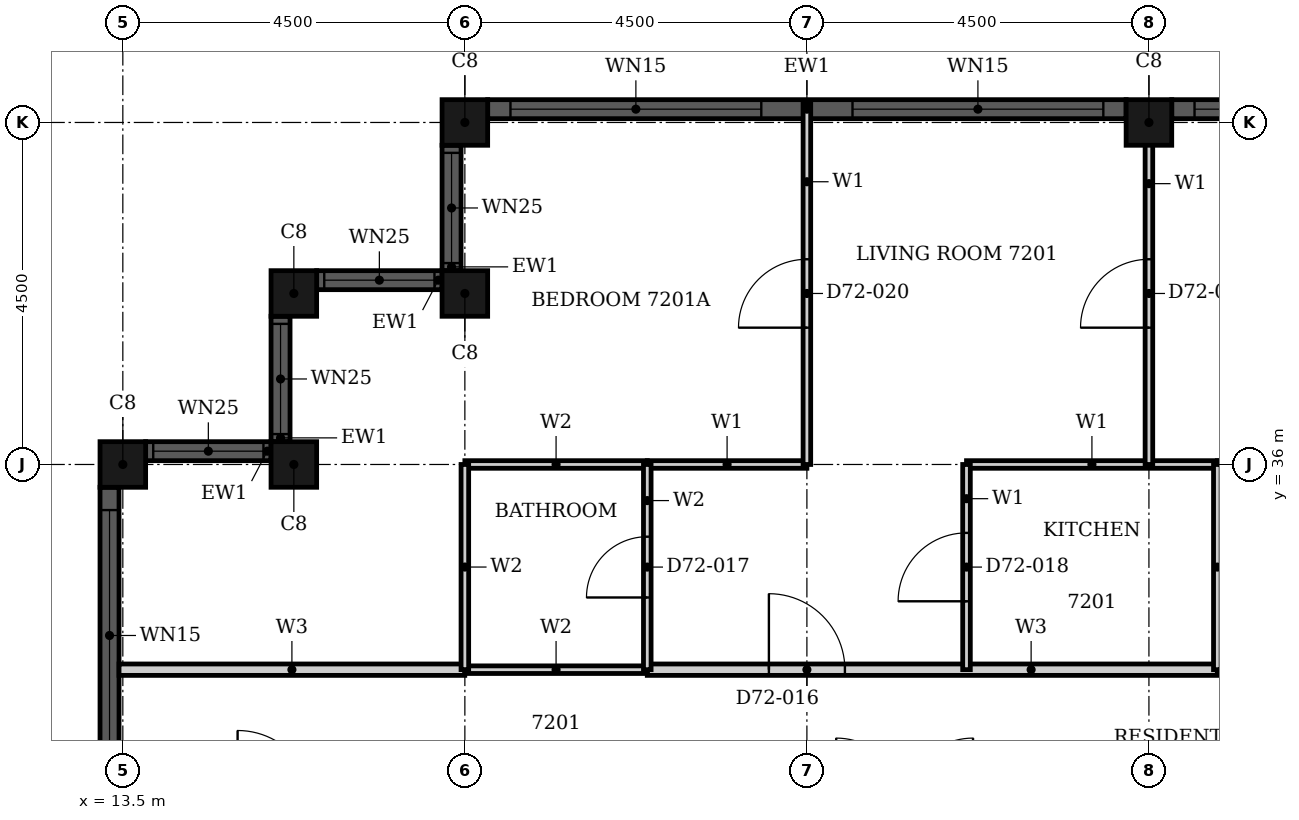
"""IFC4 building model, lengths in metres.
Left out: names, types, materials, properties, quantities, classifications, styles, units other than length and angle.
Written with IfcOpenShell. Run it as: python <this file> out.ifc"""

import sys

from ifc_helpers import new_model, si_unit, direction, frame, frame_2d, origin, origin_2d, place, context, subcontext, project, spatial, rectangle, hollow_rectangle, extrude, element, fill, save


model = new_model("IFC4")
c1 = context("Model", 3, precision=1e-05, world=origin(), true_north=direction((0.0, 1.0)))
c2 = subcontext(c1, "Body", "Model", "MODEL_VIEW")
j1 = project(units=[si_unit("LENGTHUNIT", "METRE"), si_unit("PLANEANGLEUNIT", "RADIAN")], contexts=[c1])
p1 = place(None, origin())
s1 = spatial("IfcSite", under=j1, at=p1, CompositionType="ELEMENT")
p2 = place(p1, origin())
s2 = spatial("IfcBuilding", under=s1, at=p2, CompositionType="ELEMENT")
p3 = place(p2, frame((0.0, 0.0, 283.4)))
s3 = spatial("IfcBuildingStorey", under=s2, at=p3, CompositionType="ELEMENT", Elevation=283.4)
for number, where, z_axis, x_axis in (
    (1, (27.0, 40.5, 0.0), (0.0, 0.0, 1.0), (1.0, 0.0, 0.0)),
    (2, (18.0, 40.5, 0.0), (0.0, 0.0, 1.0), (1.0, 0.0, 0.0)),
    (3, (18.0, 38.25, 0.0), (0.0, 0.0, 1.0), (1.0, 0.0, 0.0)),
    (4, (15.75, 38.25, 0.0), (0.0, 0.0, 1.0), (1.0, 0.0, 0.0)),
    (5, (15.75, 36.0, 0.0), (0.0, 0.0, 1.0), (1.0, 0.0, 0.0)),
    (6, (13.5, 36.0, 0.0), (0.0, 0.0, 1.0), (1.0, 0.0, 0.0)),
):
    element("IfcColumn", number, at=place(p3, frame(where, z_axis=z_axis, x_axis=x_axis)), inside=s3, PredefinedType="COLUMN", context=c2, shape_type="SweptSolid", body=[
        extrude(hollow_rectangle(XDim=0.6, YDim=0.6, WallThickness=0.02, at=origin_2d()), origin(), (0.0, 0.0, 1.0), 3.7),
    ])
p4 = place(p3, frame((35.7, 40.675, 0.0), z_axis=(0.0, 0.0, 1.0), x_axis=(-1.0, 0.0, 0.0)))
e7 = element("IfcWall", 7, at=p4, inside=s3, PredefinedType="SOLIDWALL", context=c2, shape_type="SweptSolid", body=[
    extrude(rectangle(XDim=8.4, YDim=0.25, at=frame_2d((4.2, 0.0))), origin(), (0.0, 0.0, 1.0), 3.7),
])
p5 = place(p4, frame((0.3, 0.0, 0.45)))
e8 = element("IfcOpeningElement", 8, at=p5, cuts=e7, PredefinedType="OPENING", context=c2, shape_type="SweptSolid", body=[
    extrude(rectangle(XDim=3.3, YDim=2.3, at=frame_2d((1.65, 1.15))), frame((0.0, 0.135, 0.0), z_axis=(0.0, -1.0, 0.0), x_axis=(1.0, 0.0, 0.0)), (0.0, 0.0, 1.0), 0.27),
])
p6 = place(p4, frame((4.8, 0.0, 0.45)))
e9 = element("IfcOpeningElement", 9, at=p6, cuts=e7, PredefinedType="OPENING", context=c2, shape_type="SweptSolid", body=[
    extrude(rectangle(XDim=3.3, YDim=2.3, at=frame_2d((1.65, 1.15))), frame((0.0, 0.135, 0.0), z_axis=(0.0, -1.0, 0.0), x_axis=(1.0, 0.0, 0.0)), (0.0, 0.0, 1.0), 0.27),
])
p7 = place(p3, frame((26.7, 40.675, 0.0), z_axis=(0.0, 0.0, 1.0), x_axis=(-1.0, 0.0, 0.0)))
e10 = element("IfcWall", 10, at=p7, inside=s3, PredefinedType="SOLIDWALL", context=c2, shape_type="SweptSolid", body=[
    extrude(rectangle(XDim=8.4, YDim=0.25, at=frame_2d((4.2, 0.0))), origin(), (0.0, 0.0, 1.0), 3.7),
])
p8 = place(p7, frame((0.3, 0.0, 0.45)))
e11 = element("IfcOpeningElement", 11, at=p8, cuts=e10, PredefinedType="OPENING", context=c2, shape_type="SweptSolid", body=[
    extrude(rectangle(XDim=3.3, YDim=2.3, at=frame_2d((1.65, 1.15))), frame((0.0, 0.135, 0.0), z_axis=(0.0, -1.0, 0.0), x_axis=(1.0, 0.0, 0.0)), (0.0, 0.0, 1.0), 0.27),
])
p9 = place(p7, frame((4.8, 0.0, 0.45)))
e12 = element("IfcOpeningElement", 12, at=p9, cuts=e10, PredefinedType="OPENING", context=c2, shape_type="SweptSolid", body=[
    extrude(rectangle(XDim=3.3, YDim=2.3, at=frame_2d((1.65, 1.15))), frame((0.0, 0.135, 0.0), z_axis=(0.0, -1.0, 0.0), x_axis=(1.0, 0.0, 0.0)), (0.0, 0.0, 1.0), 0.27),
])
p10 = place(p3, frame((17.825, 40.2, 0.0), z_axis=(0.0, 0.0, 1.0), x_axis=(0.0, -1.0, 0.0)))
e13 = element("IfcWall", 13, at=p10, inside=s3, PredefinedType="SOLIDWALL", context=c2, shape_type="SweptSolid", body=[
    extrude(rectangle(XDim=1.65, YDim=0.25, at=frame_2d((0.825, 0.0))), origin(), (0.0, 0.0, 1.0), 3.7),
])
p11 = place(p10, frame((0.1, 0.0, 0.9)))
e14 = element("IfcOpeningElement", 14, at=p11, cuts=e13, PredefinedType="OPENING", context=c2, shape_type="SweptSolid", body=[
    extrude(rectangle(XDim=1.45, YDim=1.85, at=frame_2d((0.725, 0.925))), frame((0.0, 0.135, 0.0), z_axis=(0.0, -1.0, 0.0), x_axis=(1.0, 0.0, 0.0)), (0.0, 0.0, 1.0), 0.27),
])
p12 = place(p3, frame((17.7, 38.425, 0.0), z_axis=(0.0, 0.0, 1.0), x_axis=(-1.0, 0.0, 0.0)))
e15 = element("IfcWall", 15, at=p12, inside=s3, PredefinedType="SOLIDWALL", context=c2, shape_type="SweptSolid", body=[
    extrude(rectangle(XDim=1.65, YDim=0.25, at=frame_2d((0.825, 0.0))), origin(), (0.0, 0.0, 1.0), 3.7),
])
p13 = place(p12, frame((0.1, 0.0, 0.9)))
e16 = element("IfcOpeningElement", 16, at=p13, cuts=e15, PredefinedType="OPENING", context=c2, shape_type="SweptSolid", body=[
    extrude(rectangle(XDim=1.45, YDim=1.85, at=frame_2d((0.725, 0.925))), frame((0.0, 0.135, 0.0), z_axis=(0.0, -1.0, 0.0), x_axis=(1.0, 0.0, 0.0)), (0.0, 0.0, 1.0), 0.27),
])
p14 = place(p3, frame((15.575, 37.95, 0.0), z_axis=(0.0, 0.0, 1.0), x_axis=(0.0, -1.0, 0.0)))
e17 = element("IfcWall", 17, at=p14, inside=s3, PredefinedType="SOLIDWALL", context=c2, shape_type="SweptSolid", body=[
    extrude(rectangle(XDim=1.65, YDim=0.25, at=frame_2d((0.825, 0.0))), origin(), (0.0, 0.0, 1.0), 3.7),
])
p15 = place(p14, frame((0.1, 0.0, 0.9)))
e18 = element("IfcOpeningElement", 18, at=p15, cuts=e17, PredefinedType="OPENING", context=c2, shape_type="SweptSolid", body=[
    extrude(rectangle(XDim=1.45, YDim=1.85, at=frame_2d((0.725, 0.925))), frame((0.0, 0.135, 0.0), z_axis=(0.0, -1.0, 0.0), x_axis=(1.0, 0.0, 0.0)), (0.0, 0.0, 1.0), 0.27),
])
p16 = place(p3, frame((15.45, 36.175, 0.0), z_axis=(0.0, 0.0, 1.0), x_axis=(-1.0, 0.0, 0.0)))
e19 = element("IfcWall", 19, at=p16, inside=s3, PredefinedType="SOLIDWALL", context=c2, shape_type="SweptSolid", body=[
    extrude(rectangle(XDim=1.65, YDim=0.25, at=frame_2d((0.825, 0.0))), origin(), (0.0, 0.0, 1.0), 3.7),
])
p17 = place(p16, frame((0.1, 0.0, 0.9)))
e20 = element("IfcOpeningElement", 20, at=p17, cuts=e19, PredefinedType="OPENING", context=c2, shape_type="SweptSolid", body=[
    extrude(rectangle(XDim=1.45, YDim=1.85, at=frame_2d((0.725, 0.925))), frame((0.0, 0.135, 0.0), z_axis=(0.0, -1.0, 0.0), x_axis=(1.0, 0.0, 0.0)), (0.0, 0.0, 1.0), 0.27),
])
p18 = place(p3, frame((13.325, 35.7, 0.0), z_axis=(0.0, 0.0, 1.0), x_axis=(0.0, -1.0, 0.0)))
e21 = element("IfcWall", 21, at=p18, inside=s3, PredefinedType="SOLIDWALL", context=c2, shape_type="SweptSolid", body=[
    extrude(rectangle(XDim=8.4, YDim=0.25, at=frame_2d((4.2, 0.0))), origin(), (0.0, 0.0, 1.0), 3.7),
])
p19 = place(p18, frame((0.3, 0.0, 0.45)))
e22 = element("IfcOpeningElement", 22, at=p19, cuts=e21, PredefinedType="OPENING", context=c2, shape_type="SweptSolid", body=[
    extrude(rectangle(XDim=3.3, YDim=2.3, at=frame_2d((1.65, 1.15))), frame((0.0, 0.135, 0.0), z_axis=(0.0, -1.0, 0.0), x_axis=(1.0, 0.0, 0.0)), (0.0, 0.0, 1.0), 0.27),
])
p20 = place(p18, frame((4.8, 0.0, 0.45)))
e23 = element("IfcOpeningElement", 23, at=p20, cuts=e21, PredefinedType="OPENING", context=c2, shape_type="SweptSolid", body=[
    extrude(rectangle(XDim=3.3, YDim=2.3, at=frame_2d((1.65, 1.15))), frame((0.0, 0.135, 0.0), z_axis=(0.0, -1.0, 0.0), x_axis=(1.0, 0.0, 0.0)), (0.0, 0.0, 1.0), 0.27),
])
p21 = place(p3, frame((13.45, 33.3, 0.0), z_axis=(0.0, 0.0, 1.0), x_axis=(1.0, 0.0, 0.0)))
e24 = element("IfcWall", 24, at=p21, inside=s3, PredefinedType="PARTITIONING", context=c2, shape_type="SweptSolid", body=[
    extrude(rectangle(XDim=4.549, YDim=0.15, at=frame_2d((2.274, 0.0))), origin(), (0.0, 0.0, 1.0), 3.4),
])
p22 = place(p3, frame((20.4, 33.3, 0.0), z_axis=(0.0, 0.0, 1.0), x_axis=(1.0, 0.0, 0.0)))
e25 = element("IfcWall", 25, at=p22, inside=s3, PredefinedType="PARTITIONING", context=c2, shape_type="SweptSolid", body=[
    extrude(rectangle(XDim=7.5, YDim=0.15, at=frame_2d((3.75, 0.0))), origin(), (0.0, 0.0, 1.0), 3.4),
])
p23 = place(p22, frame((1.6, 0.0, 0.0)))
e26 = element("IfcOpeningElement", 26, at=p23, cuts=e25, PredefinedType="OPENING", context=c2, shape_type="SweptSolid", body=[
    extrude(rectangle(XDim=1.0, YDim=2.2, at=frame_2d((0.5, 1.1))), frame((0.0, 0.085, 0.0), z_axis=(0.0, -1.0, 0.0), x_axis=(1.0, 0.0, 0.0)), (0.0, 0.0, 1.0), 0.17),
])
p24 = place(p3, frame((20.4, 36.0, 0.0), z_axis=(0.0, 0.0, 1.0), x_axis=(1.0, 0.0, 0.0)))
e27 = element("IfcWall", 27, at=p24, inside=s3, PredefinedType="PARTITIONING", context=c2, shape_type="SweptSolid", body=[
    extrude(rectangle(XDim=2.1, YDim=0.1, at=frame_2d((1.05, 0.0))), origin(), (0.0, 0.0, 1.0), 3.4),
])
p25 = place(p3, frame((24.6, 36.0, 0.0), z_axis=(0.0, 0.0, 1.0), x_axis=(1.0, 0.0, 0.0)))
e28 = element("IfcWall", 28, at=p25, inside=s3, PredefinedType="PARTITIONING", context=c2, shape_type="SweptSolid", body=[
    extrude(rectangle(XDim=3.3, YDim=0.1, at=frame_2d((1.65, 0.0))), origin(), (0.0, 0.0, 1.0), 3.4),
])
p26 = place(p3, frame((22.5, 36.0, 0.0), z_axis=(0.0, 0.0, 1.0), x_axis=(0.0, 1.0, 0.0)))
e29 = element("IfcWall", 29, at=p26, inside=s3, PredefinedType="PARTITIONING", context=c2, shape_type="SweptSolid", body=[
    extrude(rectangle(XDim=4.74, YDim=0.1, at=frame_2d((2.37, 0.0))), origin(), (0.0, 0.0, 1.0), 3.4),
])
p27 = place(p26, frame((1.8, 0.0, 0.0)))
e30 = element("IfcOpeningElement", 30, at=p27, cuts=e29, PredefinedType="OPENING", context=c2, shape_type="SweptSolid", body=[
    extrude(rectangle(XDim=0.9, YDim=2.1, at=frame_2d((0.45, 1.05))), frame((0.0, 0.06, 0.0), z_axis=(0.0, -1.0, 0.0), x_axis=(1.0, 0.0, 0.0)), (0.0, 0.0, 1.0), 0.12),
])
p28 = place(p3, frame((24.6, 33.3, 0.0), z_axis=(0.0, 0.0, 1.0), x_axis=(0.0, 1.0, 0.0)))
e31 = element("IfcWall", 31, at=p28, inside=s3, PredefinedType="PARTITIONING", context=c2, shape_type="SweptSolid", body=[
    extrude(rectangle(XDim=2.7, YDim=0.1, at=frame_2d((1.35, 0.0))), origin(), (0.0, 0.0, 1.0), 3.4),
])
p29 = place(p28, frame((0.9, 0.0, 0.0)))
e32 = element("IfcOpeningElement", 32, at=p29, cuts=e31, PredefinedType="OPENING", context=c2, shape_type="SweptSolid", body=[
    extrude(rectangle(XDim=0.9, YDim=2.1, at=frame_2d((0.45, 1.05))), frame((0.0, 0.06, 0.0), z_axis=(0.0, -1.0, 0.0), x_axis=(1.0, 0.0, 0.0)), (0.0, 0.0, 1.0), 0.12),
])
p30 = place(p3, frame((27.0, 36.0, 0.0), z_axis=(0.0, 0.0, 1.0), x_axis=(0.0, 1.0, 0.0)))
e33 = element("IfcWall", 33, at=p30, inside=s3, PredefinedType="PARTITIONING", context=c2, shape_type="SweptSolid", body=[
    extrude(rectangle(XDim=4.69, YDim=0.1, at=frame_2d((2.345, 0.0))), origin(), (0.0, 0.0, 1.0), 3.4),
])
p31 = place(p30, frame((1.8, 0.0, 0.0)))
e34 = element("IfcOpeningElement", 34, at=p31, cuts=e33, PredefinedType="OPENING", context=c2, shape_type="SweptSolid", body=[
    extrude(rectangle(XDim=0.9, YDim=2.1, at=frame_2d((0.45, 1.05))), frame((0.0, 0.06, 0.0), z_axis=(0.0, -1.0, 0.0), x_axis=(1.0, 0.0, 0.0)), (0.0, 0.0, 1.0), 0.12),
])
p32 = place(p3, frame((18.0, 33.3, 0.0), z_axis=(0.0, 0.0, 1.0), x_axis=(1.0, 0.0, 0.0)))
e35 = element("IfcWall", 35, at=p32, inside=s3, PredefinedType="PARTITIONING", context=c2, shape_type="SweptSolid", body=[
    extrude(rectangle(XDim=2.4, YDim=0.1, at=frame_2d((1.2, 0.0))), origin(), (0.0, 0.0, 1.0), 3.4),
])
p33 = place(p3, frame((27.9, 33.3, 0.0), z_axis=(0.0, 0.0, 1.0), x_axis=(1.0, 0.0, 0.0)))
e36 = element("IfcWall", 36, at=p33, inside=s3, PredefinedType="PARTITIONING", context=c2, shape_type="SweptSolid", body=[
    extrude(rectangle(XDim=7.2, YDim=0.1, at=frame_2d((3.6, 0.0))), origin(), (0.0, 0.0, 1.0), 3.4),
])
p34 = place(p3, frame((18.0, 36.0, 0.0), z_axis=(0.0, 0.0, 1.0), x_axis=(1.0, 0.0, 0.0)))
e37 = element("IfcWall", 37, at=p34, inside=s3, PredefinedType="PARTITIONING", context=c2, shape_type="SweptSolid", body=[
    extrude(rectangle(XDim=2.4, YDim=0.1, at=frame_2d((1.2, 0.0))), origin(), (0.0, 0.0, 1.0), 3.4),
])
p35 = place(p3, frame((27.9, 36.0, 0.0), z_axis=(0.0, 0.0, 1.0), x_axis=(1.0, 0.0, 0.0)))
e38 = element("IfcWall", 38, at=p35, inside=s3, PredefinedType="PARTITIONING", context=c2, shape_type="SweptSolid", body=[
    extrude(rectangle(XDim=7.2, YDim=0.1, at=frame_2d((3.6, 0.0))), origin(), (0.0, 0.0, 1.0), 3.4),
])
p36 = place(p35, frame((1.4, 0.0, 0.0)))
e39 = element("IfcOpeningElement", 39, at=p36, cuts=e38, PredefinedType="OPENING", context=c2, shape_type="SweptSolid", body=[
    extrude(rectangle(XDim=0.8, YDim=2.1, at=frame_2d((0.4, 1.05))), frame((0.0, 0.06, 0.0), z_axis=(0.0, -1.0, 0.0), x_axis=(1.0, 0.0, 0.0)), (0.0, 0.0, 1.0), 0.12),
])
p37 = place(p35, frame((5.0, 0.0, 0.0)))
e40 = element("IfcOpeningElement", 40, at=p37, cuts=e38, PredefinedType="OPENING", context=c2, shape_type="SweptSolid", body=[
    extrude(rectangle(XDim=0.8, YDim=2.1, at=frame_2d((0.4, 1.05))), frame((0.0, 0.06, 0.0), z_axis=(0.0, -1.0, 0.0), x_axis=(1.0, 0.0, 0.0)), (0.0, 0.0, 1.0), 0.12),
])
p38 = place(p3, frame((18.0, 33.301, 0.0), z_axis=(0.0, 0.0, 1.0), x_axis=(0.0, 1.0, 0.0)))
e41 = element("IfcWall", 41, at=p38, inside=s3, PredefinedType="PARTITIONING", context=c2, shape_type="SweptSolid", body=[
    extrude(rectangle(XDim=2.699, YDim=0.1, at=frame_2d((1.35, 0.0))), origin(), (0.0, 0.0, 1.0), 3.4),
])
p39 = place(p3, frame((20.4, 33.3, 0.0), z_axis=(0.0, 0.0, 1.0), x_axis=(0.0, 1.0, 0.0)))
e42 = element("IfcWall", 42, at=p39, inside=s3, PredefinedType="PARTITIONING", context=c2, shape_type="SweptSolid", body=[
    extrude(rectangle(XDim=2.7, YDim=0.1, at=frame_2d((1.35, 0.0))), origin(), (0.0, 0.0, 1.0), 3.4),
])
p40 = place(p39, frame((0.95, 0.0, 0.0)))
e43 = element("IfcOpeningElement", 43, at=p40, cuts=e42, PredefinedType="OPENING", context=c2, shape_type="SweptSolid", body=[
    extrude(rectangle(XDim=0.8, YDim=2.1, at=frame_2d((0.4, 1.05))), frame((0.0, 0.06, 0.0), z_axis=(0.0, -1.0, 0.0), x_axis=(1.0, 0.0, 0.0)), (0.0, 0.0, 1.0), 0.12),
])
p41 = place(p3, frame((27.9, 33.3, 0.0), z_axis=(0.0, 0.0, 1.0), x_axis=(0.0, 1.0, 0.0)))
e44 = element("IfcWall", 44, at=p41, inside=s3, PredefinedType="PARTITIONING", context=c2, shape_type="SweptSolid", body=[
    extrude(rectangle(XDim=2.7, YDim=0.1, at=frame_2d((1.35, 0.0))), origin(), (0.0, 0.0, 1.0), 3.4),
])
p42 = place(p6, origin())
e45 = element("IfcWindow", 45, at=p42, inside=s3, PartitioningType="SINGLE_PANEL", PredefinedType="WINDOW", context=c2, shape_type="SweptSolid", body=[
    extrude(rectangle(XDim=3.3, YDim=2.3, at=frame_2d((1.65, 1.15))), frame((0.0, 0.03, 0.0), z_axis=(0.0, -1.0, 0.0), x_axis=(1.0, 0.0, 0.0)), (0.0, 0.0, 1.0), 0.06),
])
fill(e9, e45)
p43 = place(p8, origin())
e46 = element("IfcWindow", 46, at=p43, inside=s3, PartitioningType="SINGLE_PANEL", PredefinedType="WINDOW", context=c2, shape_type="SweptSolid", body=[
    extrude(rectangle(XDim=3.3, YDim=2.3, at=frame_2d((1.65, 1.15))), frame((0.0, 0.03, 0.0), z_axis=(0.0, -1.0, 0.0), x_axis=(1.0, 0.0, 0.0)), (0.0, 0.0, 1.0), 0.06),
])
fill(e11, e46)
p44 = place(p9, origin())
e47 = element("IfcWindow", 47, at=p44, inside=s3, PartitioningType="SINGLE_PANEL", PredefinedType="WINDOW", context=c2, shape_type="SweptSolid", body=[
    extrude(rectangle(XDim=3.3, YDim=2.3, at=frame_2d((1.65, 1.15))), frame((0.0, 0.03, 0.0), z_axis=(0.0, -1.0, 0.0), x_axis=(1.0, 0.0, 0.0)), (0.0, 0.0, 1.0), 0.06),
])
fill(e12, e47)
p45 = place(p11, origin())
e48 = element("IfcWindow", 48, at=p45, inside=s3, PartitioningType="SINGLE_PANEL", PredefinedType="WINDOW", context=c2, shape_type="SweptSolid", body=[
    extrude(rectangle(XDim=1.45, YDim=1.85, at=frame_2d((0.725, 0.925))), frame((0.0, 0.03, 0.0), z_axis=(0.0, -1.0, 0.0), x_axis=(1.0, 0.0, 0.0)), (0.0, 0.0, 1.0), 0.06),
])
fill(e14, e48)
p46 = place(p13, origin())
e49 = element("IfcWindow", 49, at=p46, inside=s3, PartitioningType="SINGLE_PANEL", PredefinedType="WINDOW", context=c2, shape_type="SweptSolid", body=[
    extrude(rectangle(XDim=1.45, YDim=1.85, at=frame_2d((0.725, 0.925))), frame((0.0, 0.03, 0.0), z_axis=(0.0, -1.0, 0.0), x_axis=(1.0, 0.0, 0.0)), (0.0, 0.0, 1.0), 0.06),
])
fill(e16, e49)
p47 = place(p15, origin())
e50 = element("IfcWindow", 50, at=p47, inside=s3, PartitioningType="SINGLE_PANEL", PredefinedType="WINDOW", context=c2, shape_type="SweptSolid", body=[
    extrude(rectangle(XDim=1.45, YDim=1.85, at=frame_2d((0.725, 0.925))), frame((0.0, 0.03, 0.0), z_axis=(0.0, -1.0, 0.0), x_axis=(1.0, 0.0, 0.0)), (0.0, 0.0, 1.0), 0.06),
])
fill(e18, e50)
p48 = place(p17, origin())
e51 = element("IfcWindow", 51, at=p48, inside=s3, PartitioningType="SINGLE_PANEL", PredefinedType="WINDOW", context=c2, shape_type="SweptSolid", body=[
    extrude(rectangle(XDim=1.45, YDim=1.85, at=frame_2d((0.725, 0.925))), frame((0.0, 0.03, 0.0), z_axis=(0.0, -1.0, 0.0), x_axis=(1.0, 0.0, 0.0)), (0.0, 0.0, 1.0), 0.06),
])
fill(e20, e51)
p49 = place(p19, origin())
e52 = element("IfcWindow", 52, at=p49, inside=s3, PartitioningType="SINGLE_PANEL", PredefinedType="WINDOW", context=c2, shape_type="SweptSolid", body=[
    extrude(rectangle(XDim=3.3, YDim=2.3, at=frame_2d((1.65, 1.15))), frame((0.0, 0.03, 0.0), z_axis=(0.0, -1.0, 0.0), x_axis=(1.0, 0.0, 0.0)), (0.0, 0.0, 1.0), 0.06),
])
fill(e22, e52)
p50 = place(p23, origin())
e53 = element("IfcDoor", 53, at=p50, inside=s3, OperationType="SINGLE_SWING_RIGHT", PredefinedType="DOOR", context=c2, shape_type="SweptSolid", body=[
    extrude(rectangle(XDim=1.0, YDim=2.2, at=frame_2d((0.5, 1.1))), frame((0.0, 0.025, 0.0), z_axis=(0.0, -1.0, 0.0), x_axis=(1.0, 0.0, 0.0)), (0.0, 0.0, 1.0), 0.05),
])
fill(e26, e53)
p51 = place(p40, origin())
e54 = element("IfcDoor", 54, at=p51, inside=s3, OperationType="SINGLE_SWING_LEFT", PredefinedType="DOOR", context=c2, shape_type="SweptSolid", body=[
    extrude(rectangle(XDim=0.8, YDim=2.1, at=frame_2d((0.4, 1.05))), frame((0.0, 0.025, 0.0), z_axis=(0.0, -1.0, 0.0), x_axis=(1.0, 0.0, 0.0)), (0.0, 0.0, 1.0), 0.05),
])
fill(e43, e54)
p52 = place(p29, origin())
e55 = element("IfcDoor", 55, at=p52, inside=s3, OperationType="SINGLE_SWING_LEFT", PredefinedType="DOOR", context=c2, shape_type="SweptSolid", body=[
    extrude(rectangle(XDim=0.9, YDim=2.1, at=frame_2d((0.45, 1.05))), frame((0.0, 0.025, 0.0), z_axis=(0.0, -1.0, 0.0), x_axis=(1.0, 0.0, 0.0)), (0.0, 0.0, 1.0), 0.05),
])
fill(e32, e55)
p53 = place(p27, origin())
e56 = element("IfcDoor", 56, at=p53, inside=s3, OperationType="SINGLE_SWING_RIGHT", PredefinedType="DOOR", context=c2, shape_type="SweptSolid", body=[
    extrude(rectangle(XDim=0.9, YDim=2.1, at=frame_2d((0.45, 1.05))), frame((0.0, 0.025, 0.0), z_axis=(0.0, -1.0, 0.0), x_axis=(1.0, 0.0, 0.0)), (0.0, 0.0, 1.0), 0.05),
])
fill(e30, e56)
p54 = place(p31, origin())
e57 = element("IfcDoor", 57, at=p54, inside=s3, OperationType="SINGLE_SWING_RIGHT", PredefinedType="DOOR", context=c2, shape_type="SweptSolid", body=[
    extrude(rectangle(XDim=0.9, YDim=2.1, at=frame_2d((0.45, 1.05))), frame((0.0, 0.025, 0.0), z_axis=(0.0, -1.0, 0.0), x_axis=(1.0, 0.0, 0.0)), (0.0, 0.0, 1.0), 0.05),
])
fill(e34, e57)
save(model, sys.argv[1])
